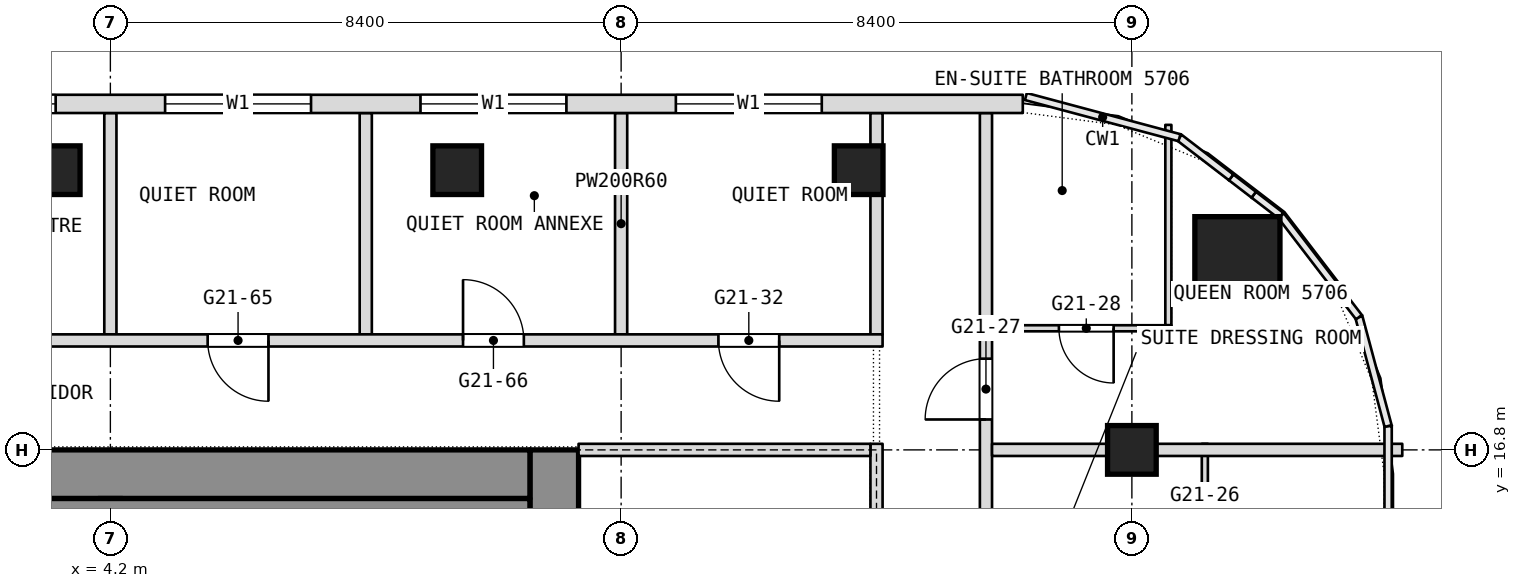
"""IFC4 building model, lengths in metres.
Left out: names, types, materials, properties, quantities, classifications, styles, units other than length and angle.
Written with IfcOpenShell. Run it as: python <this file> out.ifc"""

import sys

from ifc_helpers import new_model, si_unit, direction, frame, frame_2d, origin, origin_2d, place, context, subcontext, project, spatial, rectangle, extrude, element, fill, save


model = new_model("IFC4")
c1 = context("Model", 3, precision=1e-05, world=origin(), true_north=direction((0.0, 1.0)))
c2 = subcontext(c1, "Body", "Model", "MODEL_VIEW")
j1 = project(units=[si_unit("LENGTHUNIT", "METRE"), si_unit("PLANEANGLEUNIT", "RADIAN")], contexts=[c1])
p1 = place(None, origin())
s1 = spatial("IfcSite", under=j1, at=p1, CompositionType="ELEMENT")
p2 = place(p1, origin())
s2 = spatial("IfcBuilding", under=s1, at=p2, CompositionType="ELEMENT")
p3 = place(p2, frame((0.0, 0.0, 241.7)))
s3 = spatial("IfcBuildingStorey", under=s2, at=p3, CompositionType="ELEMENT", Elevation=241.7)
p4 = place(p3, frame((11.5, 0.0, 0.0), z_axis=(0.0, 0.0, 1.0), x_axis=(0.0, 1.0, 0.0)))
e1 = element("IfcWall", 1, at=p4, inside=s3, PredefinedType="SHEAR", context=c2, shape_type="SweptSolid", body=[
    extrude(rectangle(XDim=16.8, YDim=0.8, at=frame_2d((8.4, 0.0))), origin(), (0.0, 0.0, 1.0), 3.6),
])
p5 = place(p4, frame((2.3, 0.0, 0.0)))
e2 = element("IfcOpeningElement", 2, at=p5, cuts=e1, PredefinedType="OPENING", context=c2, shape_type="SweptSolid", body=[
    extrude(rectangle(XDim=1.1, YDim=2.1, at=frame_2d((0.55, 1.05))), frame((0.0, 0.4, 0.0), z_axis=(0.0, -1.0, 0.0), x_axis=(1.0, 0.0, 0.0)), (0.0, 0.0, 1.0), 0.8),
])
p6 = place(p4, frame((4.85, 0.0, 0.0)))
e3 = element("IfcOpeningElement", 3, at=p6, cuts=e1, PredefinedType="OPENING", context=c2, shape_type="SweptSolid", body=[
    extrude(rectangle(XDim=1.1, YDim=2.1, at=frame_2d((0.55, 1.05))), frame((0.0, 0.4, 0.0), z_axis=(0.0, -1.0, 0.0), x_axis=(1.0, 0.0, 0.0)), (0.0, 0.0, 1.0), 0.8),
])
p7 = place(p4, frame((6.825, 0.0, 0.0)))
e4 = element("IfcOpeningElement", 4, at=p7, cuts=e1, PredefinedType="OPENING", context=c2, shape_type="SweptSolid", body=[
    extrude(rectangle(XDim=1.2, YDim=2.1, at=frame_2d((0.6, 1.05))), frame((0.0, 0.4, 0.0), z_axis=(0.0, -1.0, 0.0), x_axis=(1.0, 0.0, 0.0)), (0.0, 0.0, 1.0), 0.8),
])
p8 = place(p4, frame((13.4, 0.0, 0.0)))
e5 = element("IfcOpeningElement", 5, at=p8, cuts=e1, PredefinedType="OPENING", context=c2, shape_type="SweptSolid", body=[
    extrude(rectangle(XDim=1.1, YDim=2.1, at=frame_2d((0.55, 1.05))), frame((0.0, 0.4, 0.0), z_axis=(0.0, -1.0, 0.0), x_axis=(1.0, 0.0, 0.0)), (0.0, 0.0, 1.0), 0.8),
])
p9 = place(p4, frame((10.85, 0.0, 0.0)))
e6 = element("IfcOpeningElement", 6, at=p9, cuts=e1, PredefinedType="OPENING", context=c2, shape_type="SweptSolid", body=[
    extrude(rectangle(XDim=1.1, YDim=2.1, at=frame_2d((0.55, 1.05))), frame((0.0, 0.4, 0.0), z_axis=(0.0, -1.0, 0.0), x_axis=(1.0, 0.0, 0.0)), (0.0, 0.0, 1.0), 0.8),
])
p10 = place(p4, frame((8.775, 0.0, 0.0)))
e7 = element("IfcOpeningElement", 7, at=p10, cuts=e1, PredefinedType="OPENING", context=c2, shape_type="SweptSolid", body=[
    extrude(rectangle(XDim=1.2, YDim=2.1, at=frame_2d((0.6, 1.05))), frame((0.0, 0.4, 0.0), z_axis=(0.0, -1.0, 0.0), x_axis=(1.0, 0.0, 0.0)), (0.0, 0.0, 1.0), 0.8),
])
p11 = place(p3, frame((-11.1, 16.4, 0.0), z_axis=(0.0, 0.0, 1.0), x_axis=(1.0, 0.0, 0.0)))
e8 = element("IfcWall", 8, at=p11, inside=s3, PredefinedType="SHEAR", context=c2, shape_type="SweptSolid", body=[
    extrude(rectangle(XDim=22.2, YDim=0.8, at=frame_2d((11.1, 0.0))), origin(), (0.0, 0.0, 1.0), 3.6),
])
p12 = place(p3, frame((4.2, 0.8, 0.0), z_axis=(0.0, 0.0, 1.0), x_axis=(0.0, 1.0, 0.0)))
e9 = element("IfcWall", 9, at=p12, inside=s3, PredefinedType="SHEAR", context=c2, shape_type="SweptSolid", body=[
    extrude(rectangle(XDim=15.2, YDim=0.4, at=frame_2d((7.6, 0.0))), origin(), (0.0, 0.0, 1.0), 3.6),
])
p13 = place(p12, frame((5.95, 0.0, 0.0)))
e10 = element("IfcOpeningElement", 10, at=p13, cuts=e9, PredefinedType="OPENING", context=c2, shape_type="SweptSolid", body=[
    extrude(rectangle(XDim=1.2, YDim=2.1, at=frame_2d((0.6, 1.05))), frame((0.0, 0.2, 0.0), z_axis=(0.0, -1.0, 0.0), x_axis=(1.0, 0.0, 0.0)), (0.0, 0.0, 1.0), 0.4),
])
p14 = place(p3, frame((22.736, 19.936, 0.0), z_axis=(0.0, 0.0, 1.0), x_axis=(1.0, 0.0, 0.0)))
e11 = element("IfcColumn", 11, at=p14, inside=s3, PredefinedType="COLUMN", context=c2, shape_type="SweptSolid", body=[
    extrude(rectangle(XDim=1.4, YDim=1.4, at=origin_2d()), origin(), (0.0, 0.0, 1.0), 3.6),
])
for number, where, z_axis, x_axis in (
    (12, (21.0, 16.8, 0.0), (0.0, 0.0, 1.0), (1.0, 0.0, 0.0)),
    (13, (3.302, 21.4, 0.0), (0.0, 0.0, 1.0), (1.0, 0.0, 0.0)),
    (14, (9.904, 21.4, 0.0), (0.0, 0.0, 1.0), (1.0, 0.0, 0.0)),
    (15, (16.507, 21.4, 0.0), (0.0, 0.0, 1.0), (1.0, 0.0, 0.0)),
):
    element("IfcColumn", number, at=place(p3, frame(where, z_axis=z_axis, x_axis=x_axis)), inside=s3, PredefinedType="COLUMN", context=c2, shape_type="SweptSolid", body=[
        extrude(rectangle(XDim=0.8, YDim=0.8, at=origin_2d()), origin(), (0.0, 0.0, 1.0), 3.6),
    ])
p15 = place(p3, frame((22.2, 14.45, 0.0), z_axis=(0.0, 0.0, 1.0), x_axis=(0.0, 1.0, 0.0)))
e16 = element("IfcWall", 16, at=p15, inside=s3, PredefinedType="PARTITIONING", context=c2, shape_type="SweptSolid", body=[
    extrude(rectangle(XDim=2.45, YDim=0.1, at=frame_2d((1.225, 0.0))), origin(), (0.0, 0.0, 1.0), 3.34),
])
p16 = place(p15, frame((0.15, 0.0, 0.0)))
e17 = element("IfcOpeningElement", 17, at=p16, cuts=e16, PredefinedType="OPENING", context=c2, shape_type="SweptSolid", body=[
    extrude(rectangle(XDim=0.9, YDim=2.1, at=frame_2d((0.45, 1.05))), frame((0.0, 0.05, 0.0), z_axis=(0.0, -1.0, 0.0), x_axis=(1.0, 0.0, 0.0)), (0.0, 0.0, 1.0), 0.1),
])
p17 = place(p3, frame((21.6, 18.85, 0.0), z_axis=(0.0, 0.0, 1.0), x_axis=(0.0, 1.0, 0.0)))
e18 = element("IfcWall", 18, at=p17, inside=s3, PredefinedType="PARTITIONING", context=c2, shape_type="SweptSolid", body=[
    extrude(rectangle(XDim=3.295, YDim=0.1, at=frame_2d((1.647, 0.0))), origin(), (0.0, 0.0, 1.0), 3.34),
])
p18 = place(p3, frame((18.6, -26.751, 0.0), z_axis=(0.0, 0.0, 1.0), x_axis=(0.0, 1.0, 0.0)))
e19 = element("IfcWall", 19, at=p18, inside=s3, PredefinedType="PARTITIONING", context=c2, shape_type="SweptSolid", body=[
    extrude(rectangle(XDim=49.091, YDim=0.2, at=frame_2d((24.545, 0.0))), origin(), (0.0, 0.0, 1.0), 3.34),
])
p19 = place(p18, frame((4.226, 0.0, 0.0)))
e20 = element("IfcOpeningElement", 20, at=p19, cuts=e19, PredefinedType="OPENING", context=c2, shape_type="SweptSolid", body=[
    extrude(rectangle(XDim=1.8, YDim=2.1, at=frame_2d((0.9, 1.05))), frame((0.0, 0.1, 0.0), z_axis=(0.0, -1.0, 0.0), x_axis=(1.0, 0.0, 0.0)), (0.0, 0.0, 1.0), 0.2),
])
p20 = place(p18, frame((13.251, 0.0, 0.0)))
e21 = element("IfcOpeningElement", 21, at=p20, cuts=e19, PredefinedType="OPENING", context=c2, shape_type="SweptSolid", body=[
    extrude(rectangle(XDim=1.8, YDim=2.1, at=frame_2d((0.9, 1.05))), frame((0.0, 0.1, 0.0), z_axis=(0.0, -1.0, 0.0), x_axis=(1.0, 0.0, 0.0)), (0.0, 0.0, 1.0), 0.2),
])
p21 = place(p18, frame((21.151, 0.0, 0.0)))
e22 = element("IfcOpeningElement", 22, at=p21, cuts=e19, PredefinedType="OPENING", context=c2, shape_type="SweptSolid", body=[
    extrude(rectangle(XDim=1.0, YDim=2.1, at=frame_2d((0.5, 1.05))), frame((0.0, 0.1, 0.0), z_axis=(0.0, -1.0, 0.0), x_axis=(1.0, 0.0, 0.0)), (0.0, 0.0, 1.0), 0.2),
])
p22 = place(p18, frame((22.951, 0.0, 0.0)))
e23 = element("IfcOpeningElement", 23, at=p22, cuts=e19, PredefinedType="OPENING", context=c2, shape_type="SweptSolid", body=[
    extrude(rectangle(XDim=1.0, YDim=2.1, at=frame_2d((0.5, 1.05))), frame((0.0, 0.1, 0.0), z_axis=(0.0, -1.0, 0.0), x_axis=(1.0, 0.0, 0.0)), (0.0, 0.0, 1.0), 0.2),
])
p23 = place(p18, frame((27.151, 0.0, 0.0)))
e24 = element("IfcOpeningElement", 24, at=p23, cuts=e19, PredefinedType="OPENING", context=c2, shape_type="SweptSolid", body=[
    extrude(rectangle(XDim=1.0, YDim=2.1, at=frame_2d((0.5, 1.05))), frame((0.0, 0.1, 0.0), z_axis=(0.0, -1.0, 0.0), x_axis=(1.0, 0.0, 0.0)), (0.0, 0.0, 1.0), 0.2),
])
p24 = place(p18, frame((33.751, 0.0, 0.0)))
e25 = element("IfcOpeningElement", 25, at=p24, cuts=e19, PredefinedType="OPENING", context=c2, shape_type="SweptSolid", body=[
    extrude(rectangle(XDim=1.0, YDim=2.1, at=frame_2d((0.5, 1.05))), frame((0.0, 0.1, 0.0), z_axis=(0.0, -1.0, 0.0), x_axis=(1.0, 0.0, 0.0)), (0.0, 0.0, 1.0), 0.2),
])
p25 = place(p18, frame((38.851, 0.0, 0.0)))
e26 = element("IfcOpeningElement", 26, at=p25, cuts=e19, PredefinedType="OPENING", context=c2, shape_type="SweptSolid", body=[
    extrude(rectangle(XDim=1.1, YDim=2.1, at=frame_2d((0.55, 1.05))), frame((0.0, 0.1, 0.0), z_axis=(0.0, -1.0, 0.0), x_axis=(1.0, 0.0, 0.0)), (0.0, 0.0, 1.0), 0.2),
])
p26 = place(p18, frame((44.051, 0.0, 0.0)))
e27 = element("IfcOpeningElement", 27, at=p26, cuts=e19, PredefinedType="OPENING", context=c2, shape_type="SweptSolid", body=[
    extrude(rectangle(XDim=1.0, YDim=2.1, at=frame_2d((0.5, 1.05))), frame((0.0, 0.1, 0.0), z_axis=(0.0, -1.0, 0.0), x_axis=(1.0, 0.0, 0.0)), (0.0, 0.0, 1.0), 0.2),
])
for number, where, z_axis, x_axis in (
    (28, (16.8, 18.7, 0.0), (0.0, 0.0, 1.0), (0.0, 1.0, 0.0)),
    (29, (12.6, 18.7, 0.0), (0.0, 0.0, 1.0), (0.0, 1.0, 0.0)),
    (30, (8.4, 18.7, 0.0), (0.0, 0.0, 1.0), (0.0, 1.0, 0.0)),
    (31, (4.2, 18.7, 0.0), (0.0, 0.0, 1.0), (0.0, 1.0, 0.0)),
):
    element("IfcWall", number, at=place(p3, frame(where, z_axis=z_axis, x_axis=x_axis)), inside=s3, PredefinedType="PARTITIONING", context=c2, shape_type="SweptSolid", body=[
        extrude(rectangle(XDim=3.64, YDim=0.2, at=frame_2d((1.82, 0.0))), origin(), (0.0, 0.0, 1.0), 3.34),
    ])
p27 = place(p3, frame((18.7, 16.8, 0.0), z_axis=(0.0, 0.0, 1.0), x_axis=(1.0, 0.0, 0.0)))
e32 = element("IfcWall", 32, at=p27, inside=s3, PredefinedType="PARTITIONING", context=c2, shape_type="SweptSolid", body=[
    extrude(rectangle(XDim=6.747, YDim=0.2, at=frame_2d((3.374, 0.0))), origin(), (0.0, 0.0, 1.0), 2.94),
])
p28 = place(p3, frame((-16.9, 18.6, 0.0), z_axis=(0.0, 0.0, 1.0), x_axis=(1.0, 0.0, 0.0)))
e33 = element("IfcWall", 33, at=p28, inside=s3, PredefinedType="PARTITIONING", context=c2, shape_type="SweptSolid", body=[
    extrude(rectangle(XDim=33.8, YDim=0.2, at=frame_2d((16.9, 0.0))), origin(), (0.0, 0.0, 1.0), 3.34),
])
p29 = place(p28, frame((1.7, 0.0, 0.0)))
e34 = element("IfcOpeningElement", 34, at=p29, cuts=e33, PredefinedType="OPENING", context=c2, shape_type="SweptSolid", body=[
    extrude(rectangle(XDim=1.0, YDim=2.1, at=frame_2d((0.5, 1.05))), frame((0.0, 0.1, 0.0), z_axis=(0.0, -1.0, 0.0), x_axis=(1.0, 0.0, 0.0)), (0.0, 0.0, 1.0), 0.2),
])
p30 = place(p28, frame((7.6, 0.0, 0.0)))
e35 = element("IfcOpeningElement", 35, at=p30, cuts=e33, PredefinedType="OPENING", context=c2, shape_type="SweptSolid", body=[
    extrude(rectangle(XDim=1.8, YDim=2.1, at=frame_2d((0.9, 1.05))), frame((0.0, 0.1, 0.0), z_axis=(0.0, -1.0, 0.0), x_axis=(1.0, 0.0, 0.0)), (0.0, 0.0, 1.0), 0.2),
])
p31 = place(p28, frame((16.0, 0.0, 0.0)))
e36 = element("IfcOpeningElement", 36, at=p31, cuts=e33, PredefinedType="OPENING", context=c2, shape_type="SweptSolid", body=[
    extrude(rectangle(XDim=1.8, YDim=2.1, at=frame_2d((0.9, 1.05))), frame((0.0, 0.1, 0.0), z_axis=(0.0, -1.0, 0.0), x_axis=(1.0, 0.0, 0.0)), (0.0, 0.0, 1.0), 0.2),
])
p32 = place(p28, frame((31.1, 0.0, 0.0)))
e37 = element("IfcOpeningElement", 37, at=p32, cuts=e33, PredefinedType="OPENING", context=c2, shape_type="SweptSolid", body=[
    extrude(rectangle(XDim=1.0, YDim=2.1, at=frame_2d((0.5, 1.05))), frame((0.0, 0.1, 0.0), z_axis=(0.0, -1.0, 0.0), x_axis=(1.0, 0.0, 0.0)), (0.0, 0.0, 1.0), 0.2),
])
p33 = place(p28, frame((22.7, 0.0, 0.0)))
e38 = element("IfcOpeningElement", 38, at=p33, cuts=e33, PredefinedType="OPENING", context=c2, shape_type="SweptSolid", body=[
    extrude(rectangle(XDim=1.0, YDim=2.1, at=frame_2d((0.5, 1.05))), frame((0.0, 0.1, 0.0), z_axis=(0.0, -1.0, 0.0), x_axis=(1.0, 0.0, 0.0)), (0.0, 0.0, 1.0), 0.2),
])
p34 = place(p28, frame((26.9, 0.0, 0.0)))
e39 = element("IfcOpeningElement", 39, at=p34, cuts=e33, PredefinedType="OPENING", context=c2, shape_type="SweptSolid", body=[
    extrude(rectangle(XDim=1.0, YDim=2.1, at=frame_2d((0.5, 1.05))), frame((0.0, 0.1, 0.0), z_axis=(0.0, -1.0, 0.0), x_axis=(1.0, 0.0, 0.0)), (0.0, 0.0, 1.0), 0.2),
])
p35 = place(p3, frame((18.7, 18.8, 0.0), z_axis=(0.0, 0.0, 1.0), x_axis=(1.0, 0.0, 0.0)))
e40 = element("IfcWall", 40, at=p35, inside=s3, PredefinedType="PARTITIONING", context=c2, shape_type="SweptSolid", body=[
    extrude(rectangle(XDim=2.95, YDim=0.1, at=frame_2d((1.475, 0.0))), origin(), (0.0, 0.0, 1.0), 3.34),
])
p36 = place(p35, frame((1.1, 0.0, 0.0)))
e41 = element("IfcOpeningElement", 41, at=p36, cuts=e40, PredefinedType="OPENING", context=c2, shape_type="SweptSolid", body=[
    extrude(rectangle(XDim=0.9, YDim=2.1, at=frame_2d((0.45, 1.05))), frame((0.0, 0.05, 0.0), z_axis=(0.0, -1.0, 0.0), x_axis=(1.0, 0.0, 0.0)), (0.0, 0.0, 1.0), 0.1),
])
p37 = place(p3, frame((19.206, 22.49, 0.0), z_axis=(0.0, 0.0, 1.0), x_axis=(-1.0, 0.0, 0.0)))
e42 = element("IfcWall", 42, at=p37, inside=s3, PredefinedType="NOTDEFINED", context=c2, shape_type="SweptSolid", body=[
    extrude(rectangle(XDim=38.412, YDim=0.3, at=frame_2d((19.206, 0.0))), origin(), (0.0, 0.0, 1.0), 3.6),
])
p38 = place(p37, frame((3.306, 0.0, 0.9)))
e43 = element("IfcOpeningElement", 43, at=p38, cuts=e42, PredefinedType="OPENING", context=c2, shape_type="SweptSolid", body=[
    extrude(rectangle(XDim=2.4, YDim=2.1, at=frame_2d((1.2, 1.05))), frame((0.0, 0.15, 0.0), z_axis=(0.0, -1.0, 0.0), x_axis=(1.0, 0.0, 0.0)), (0.0, 0.0, 1.0), 0.3),
])
p39 = place(p37, frame((7.506, 0.0, 0.9)))
e44 = element("IfcOpeningElement", 44, at=p39, cuts=e42, PredefinedType="OPENING", context=c2, shape_type="SweptSolid", body=[
    extrude(rectangle(XDim=2.4, YDim=2.1, at=frame_2d((1.2, 1.05))), frame((0.0, 0.15, 0.0), z_axis=(0.0, -1.0, 0.0), x_axis=(1.0, 0.0, 0.0)), (0.0, 0.0, 1.0), 0.3),
])
p40 = place(p37, frame((11.706, 0.0, 0.9)))
e45 = element("IfcOpeningElement", 45, at=p40, cuts=e42, PredefinedType="OPENING", context=c2, shape_type="SweptSolid", body=[
    extrude(rectangle(XDim=2.4, YDim=2.1, at=frame_2d((1.2, 1.05))), frame((0.0, 0.15, 0.0), z_axis=(0.0, -1.0, 0.0), x_axis=(1.0, 0.0, 0.0)), (0.0, 0.0, 1.0), 0.3),
])
p41 = place(p37, frame((15.906, 0.0, 0.9)))
e46 = element("IfcOpeningElement", 46, at=p41, cuts=e42, PredefinedType="OPENING", context=c2, shape_type="SweptSolid", body=[
    extrude(rectangle(XDim=2.4, YDim=2.1, at=frame_2d((1.2, 1.05))), frame((0.0, 0.15, 0.0), z_axis=(0.0, -1.0, 0.0), x_axis=(1.0, 0.0, 0.0)), (0.0, 0.0, 1.0), 0.3),
])
p42 = place(p37, frame((20.106, 0.0, 0.9)))
e47 = element("IfcOpeningElement", 47, at=p42, cuts=e42, PredefinedType="OPENING", context=c2, shape_type="SweptSolid", body=[
    extrude(rectangle(XDim=2.4, YDim=2.1, at=frame_2d((1.2, 1.05))), frame((0.0, 0.15, 0.0), z_axis=(0.0, -1.0, 0.0), x_axis=(1.0, 0.0, 0.0)), (0.0, 0.0, 1.0), 0.3),
])
p43 = place(p37, frame((24.306, 0.0, 0.9)))
e48 = element("IfcOpeningElement", 48, at=p43, cuts=e42, PredefinedType="OPENING", context=c2, shape_type="SweptSolid", body=[
    extrude(rectangle(XDim=2.4, YDim=2.1, at=frame_2d((1.2, 1.05))), frame((0.0, 0.15, 0.0), z_axis=(0.0, -1.0, 0.0), x_axis=(1.0, 0.0, 0.0)), (0.0, 0.0, 1.0), 0.3),
])
p44 = place(p37, frame((28.506, 0.0, 0.9)))
e49 = element("IfcOpeningElement", 49, at=p44, cuts=e42, PredefinedType="OPENING", context=c2, shape_type="SweptSolid", body=[
    extrude(rectangle(XDim=2.4, YDim=2.1, at=frame_2d((1.2, 1.05))), frame((0.0, 0.15, 0.0), z_axis=(0.0, -1.0, 0.0), x_axis=(1.0, 0.0, 0.0)), (0.0, 0.0, 1.0), 0.3),
])
p45 = place(p37, frame((32.706, 0.0, 0.9)))
e50 = element("IfcOpeningElement", 50, at=p45, cuts=e42, PredefinedType="OPENING", context=c2, shape_type="SweptSolid", body=[
    extrude(rectangle(XDim=2.4, YDim=2.1, at=frame_2d((1.2, 1.05))), frame((0.0, 0.15, 0.0), z_axis=(0.0, -1.0, 0.0), x_axis=(1.0, 0.0, 0.0)), (0.0, 0.0, 1.0), 0.3),
])
p46 = place(p3, frame((-11.1, 15.65, 0.0), z_axis=(0.0, 0.0, 1.0), x_axis=(1.0, 0.0, 0.0)))
e51 = element("IfcWall", 51, at=p46, inside=s3, PredefinedType="PARTITIONING", context=c2, shape_type="SweptSolid", body=[
    extrude(rectangle(XDim=22.2, YDim=0.7, at=frame_2d((11.1, 0.0))), origin(), (0.0, 0.0, 1.0), 3.34),
])
p47 = place(p3, frame((16.8, -0.1, 0.0), z_axis=(0.0, 0.0, 1.0), x_axis=(0.0, 1.0, 0.0)))
e52 = element("IfcWall", 52, at=p47, inside=s3, PredefinedType="PARTITIONING", context=c2, shape_type="SweptSolid", body=[
    extrude(rectangle(XDim=17.0, YDim=0.2, at=frame_2d((8.5, 0.0))), origin(), (0.0, 0.0, 1.0), 3.34),
])
p48 = place(p47, frame((2.2, 0.0, 0.0)))
e53 = element("IfcOpeningElement", 53, at=p48, cuts=e52, PredefinedType="OPENING", context=c2, shape_type="SweptSolid", body=[
    extrude(rectangle(XDim=1.8, YDim=2.1, at=frame_2d((0.9, 1.05))), frame((0.0, 0.1, 0.0), z_axis=(0.0, -1.0, 0.0), x_axis=(1.0, 0.0, 0.0)), (0.0, 0.0, 1.0), 0.2),
])
p49 = place(p47, frame((13.0, 0.0, 0.0)))
e54 = element("IfcOpeningElement", 54, at=p49, cuts=e52, PredefinedType="OPENING", context=c2, shape_type="SweptSolid", body=[
    extrude(rectangle(XDim=1.8, YDim=2.1, at=frame_2d((0.9, 1.05))), frame((0.0, 0.1, 0.0), z_axis=(0.0, -1.0, 0.0), x_axis=(1.0, 0.0, 0.0)), (0.0, 0.0, 1.0), 0.2),
])
p50 = place(p3, frame((11.9, 16.8, 0.0), z_axis=(0.0, 0.0, 1.0), x_axis=(1.0, 0.0, 0.0)))
e55 = element("IfcWall", 55, at=p50, inside=s3, PredefinedType="PARTITIONING", context=c2, shape_type="SweptSolid", body=[
    extrude(rectangle(XDim=4.8, YDim=0.2, at=frame_2d((2.4, 0.0))), origin(), (0.0, 0.0, 1.0), 2.94),
])
p51 = place(p26, origin())
e56 = element("IfcDoor", 56, at=p51, inside=s3, OperationType="SINGLE_SWING_LEFT", PredefinedType="DOOR", context=c2, shape_type="SweptSolid", body=[
    extrude(rectangle(XDim=1.0, YDim=2.1, at=frame_2d((0.5, 1.05))), frame((0.0, 0.025, 0.0), z_axis=(0.0, -1.0, 0.0), x_axis=(1.0, 0.0, 0.0)), (0.0, 0.0, 1.0), 0.05),
])
fill(e27, e56)
p52 = place(p32, origin())
e57 = element("IfcDoor", 57, at=p52, inside=s3, OperationType="SINGLE_SWING_RIGHT", PredefinedType="DOOR", context=c2, shape_type="SweptSolid", body=[
    extrude(rectangle(XDim=1.0, YDim=2.1, at=frame_2d((0.5, 1.05))), frame((0.0, 0.025, 0.0), z_axis=(0.0, -1.0, 0.0), x_axis=(1.0, 0.0, 0.0)), (0.0, 0.0, 1.0), 0.05),
])
fill(e37, e57)
p53 = place(p33, origin())
e58 = element("IfcDoor", 58, at=p53, inside=s3, OperationType="SINGLE_SWING_LEFT", PredefinedType="DOOR", context=c2, shape_type="SweptSolid", body=[
    extrude(rectangle(XDim=1.0, YDim=2.1, at=frame_2d((0.5, 1.05))), frame((0.0, 0.025, 0.0), z_axis=(0.0, -1.0, 0.0), x_axis=(1.0, 0.0, 0.0)), (0.0, 0.0, 1.0), 0.05),
])
fill(e38, e58)
p54 = place(p34, origin())
e59 = element("IfcDoor", 59, at=p54, inside=s3, OperationType="SINGLE_SWING_RIGHT", PredefinedType="DOOR", context=c2, shape_type="SweptSolid", body=[
    extrude(rectangle(XDim=1.0, YDim=2.1, at=frame_2d((0.5, 1.05))), frame((0.0, 0.025, 0.0), z_axis=(0.0, -1.0, 0.0), x_axis=(1.0, 0.0, 0.0)), (0.0, 0.0, 1.0), 0.05),
])
fill(e39, e59)
p55 = place(p36, origin())
e60 = element("IfcDoor", 60, at=p55, inside=s3, OperationType="SINGLE_SWING_RIGHT", PredefinedType="DOOR", context=c2, shape_type="SweptSolid", body=[
    extrude(rectangle(XDim=0.9, YDim=2.1, at=frame_2d((0.45, 1.05))), frame((0.0, 0.025, 0.0), z_axis=(0.0, -1.0, 0.0), x_axis=(1.0, 0.0, 0.0)), (0.0, 0.0, 1.0), 0.05),
])
fill(e41, e60)
p56 = place(p38, origin())
e61 = element("IfcWindow", 61, at=p56, inside=s3, PartitioningType="SINGLE_PANEL", PredefinedType="WINDOW", context=c2, shape_type="SweptSolid", body=[
    extrude(rectangle(XDim=2.4, YDim=2.1, at=frame_2d((1.2, 1.05))), frame((0.0, 0.03, 0.0), z_axis=(0.0, -1.0, 0.0), x_axis=(1.0, 0.0, 0.0)), (0.0, 0.0, 1.0), 0.06),
])
fill(e43, e61)
p57 = place(p39, origin())
e62 = element("IfcWindow", 62, at=p57, inside=s3, PartitioningType="SINGLE_PANEL", PredefinedType="WINDOW", context=c2, shape_type="SweptSolid", body=[
    extrude(rectangle(XDim=2.4, YDim=2.1, at=frame_2d((1.2, 1.05))), frame((0.0, 0.03, 0.0), z_axis=(0.0, -1.0, 0.0), x_axis=(1.0, 0.0, 0.0)), (0.0, 0.0, 1.0), 0.06),
])
fill(e44, e62)
p58 = place(p40, origin())
e63 = element("IfcWindow", 63, at=p58, inside=s3, PartitioningType="SINGLE_PANEL", PredefinedType="WINDOW", context=c2, shape_type="SweptSolid", body=[
    extrude(rectangle(XDim=2.4, YDim=2.1, at=frame_2d((1.2, 1.05))), frame((0.0, 0.03, 0.0), z_axis=(0.0, -1.0, 0.0), x_axis=(1.0, 0.0, 0.0)), (0.0, 0.0, 1.0), 0.06),
])
fill(e45, e63)
p59 = place(p41, origin())
e64 = element("IfcWindow", 64, at=p59, inside=s3, PartitioningType="SINGLE_PANEL", PredefinedType="WINDOW", context=c2, shape_type="SweptSolid", body=[
    extrude(rectangle(XDim=2.4, YDim=2.1, at=frame_2d((1.2, 1.05))), frame((0.0, 0.03, 0.0), z_axis=(0.0, -1.0, 0.0), x_axis=(1.0, 0.0, 0.0)), (0.0, 0.0, 1.0), 0.06),
])
fill(e46, e64)
save(model, sys.argv[1])
